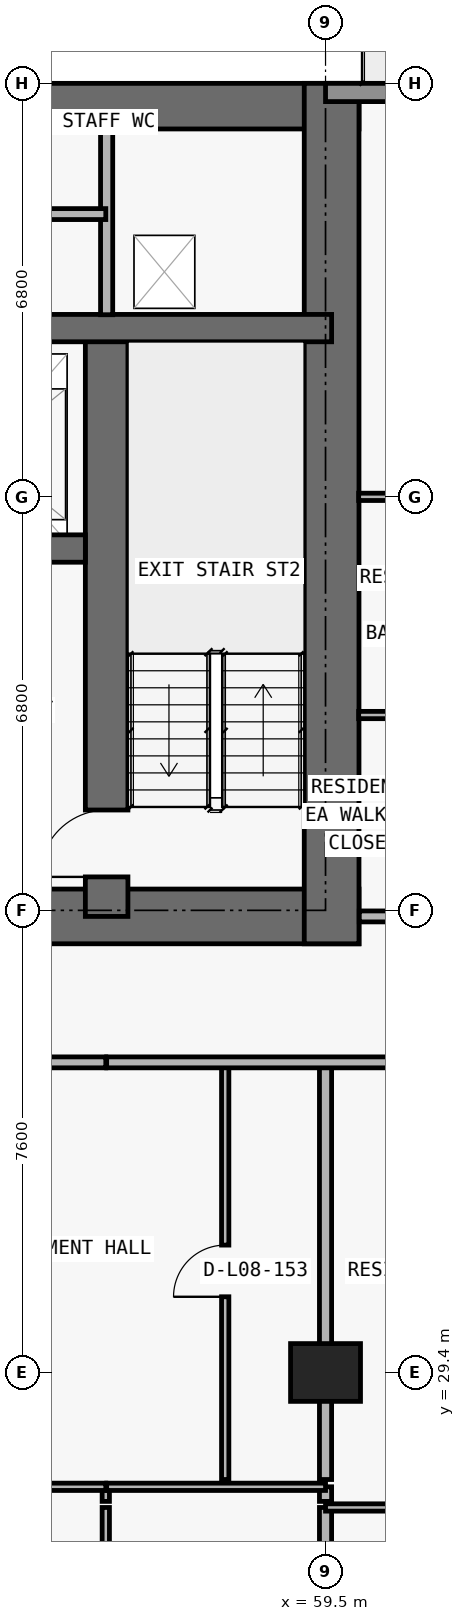
"""IFC4 building model, lengths in metres.
Left out: names, types, materials, properties, quantities, classifications, styles, units other than length and angle.
Written with IfcOpenShell. Run it as: python <this file> out.ifc"""

import sys

from ifc_helpers import new_model, si_unit, direction, frame, frame_2d, origin, origin_2d, place, context, subcontext, project, spatial, rectangle, extrude, element, fill, save


model = new_model("IFC4")
c1 = context("Model", 3, precision=1e-05, world=origin(), true_north=direction((0.0, 1.0)))
c2 = subcontext(c1, "Body", "Model", "MODEL_VIEW")
j1 = project(units=[si_unit("LENGTHUNIT", "METRE"), si_unit("PLANEANGLEUNIT", "RADIAN")], contexts=[c1])
p1 = place(None, origin())
s1 = spatial("IfcSite", under=j1, at=p1, CompositionType="ELEMENT")
p2 = place(p1, origin())
s2 = spatial("IfcBuilding", under=s1, at=p2, CompositionType="ELEMENT")
p3 = place(p2, frame((0.0, 0.0, 36.6)))
s3 = spatial("IfcBuildingStorey", under=s2, at=p3, CompositionType="ELEMENT", Elevation=36.6)
p4 = place(p3, frame((59.5, 29.4, 0.0), z_axis=(0.0, 0.0, 1.0), x_axis=(1.0, 0.0, 0.0)))
e1 = element("IfcColumn", 1, at=p4, inside=s3, PredefinedType="COLUMN", context=c2, shape_type="SweptSolid", body=[
    extrude(rectangle(XDim=1.15, YDim=0.95, at=origin_2d()), origin(), (0.0, 0.0, 1.0), 3.05),
])
p5 = place(p3, frame((17.75, 36.9, 0.0), z_axis=(0.0, 0.0, 1.0), x_axis=(1.0, 0.0, 0.0)))
e2 = element("IfcWall", 2, at=p5, inside=s3, PredefinedType="SHEAR", context=c2, shape_type="SweptSolid", body=[
    extrude(rectangle(XDim=42.3, YDim=0.9, at=frame_2d((21.15, 0.0))), origin(), (0.0, 0.0, 1.0), 3.05),
])
p6 = place(p5, frame((14.55, 0.0, 0.0)))
e3 = element("IfcOpeningElement", 3, at=p6, cuts=e2, PredefinedType="OPENING", context=c2, shape_type="SweptSolid", body=[
    extrude(rectangle(XDim=1.1, YDim=2.15, at=frame_2d((0.55, 1.075))), frame((0.0, 0.46, 0.0), z_axis=(0.0, -1.0, 0.0), x_axis=(1.0, 0.0, 0.0)), (0.0, 0.0, 1.0), 0.92),
])
p7 = place(p5, frame((6.4, 0.0, 0.0)))
e4 = element("IfcOpeningElement", 4, at=p7, cuts=e2, PredefinedType="OPENING", context=c2, shape_type="SweptSolid", body=[
    extrude(rectangle(XDim=1.05, YDim=2.15, at=frame_2d((0.525, 1.075))), frame((0.0, 0.46, 0.0), z_axis=(0.0, -1.0, 0.0), x_axis=(1.0, 0.0, 0.0)), (0.0, 0.0, 1.0), 0.92),
])
p8 = place(p5, frame((34.9, 0.0, 0.0)))
e5 = element("IfcOpeningElement", 5, at=p8, cuts=e2, PredefinedType="OPENING", context=c2, shape_type="SweptSolid", body=[
    extrude(rectangle(XDim=1.05, YDim=2.15, at=frame_2d((0.525, 1.075))), frame((0.0, 0.46, 0.0), z_axis=(0.0, -1.0, 0.0), x_axis=(1.0, 0.0, 0.0)), (0.0, 0.0, 1.0), 0.92),
])
p9 = place(p5, frame((11.012, 0.0, 0.0)))
e6 = element("IfcOpeningElement", 6, at=p9, cuts=e2, PredefinedType="OPENING", context=c2, shape_type="SweptSolid", body=[
    extrude(rectangle(XDim=1.05, YDim=2.15, at=frame_2d((0.525, 1.075))), frame((0.0, 0.46, 0.0), z_axis=(0.0, -1.0, 0.0), x_axis=(1.0, 0.0, 0.0)), (0.0, 0.0, 1.0), 0.92),
])
p10 = place(p5, frame((24.25, 0.0, 0.0)))
e7 = element("IfcOpeningElement", 7, at=p10, cuts=e2, PredefinedType="OPENING", context=c2, shape_type="SweptSolid", body=[
    extrude(rectangle(XDim=1.05, YDim=2.15, at=frame_2d((0.525, 1.075))), frame((0.0, 0.46, 0.0), z_axis=(0.0, -1.0, 0.0), x_axis=(1.0, 0.0, 0.0)), (0.0, 0.0, 1.0), 0.92),
])
p11 = place(p3, frame((17.75, 50.225, 0.0), z_axis=(0.0, 0.0, 1.0), x_axis=(1.0, 0.0, 0.0)))
e8 = element("IfcWall", 8, at=p11, inside=s3, PredefinedType="SHEAR", context=c2, shape_type="SweptSolid", body=[
    extrude(rectangle(XDim=42.3, YDim=0.75, at=frame_2d((21.15, 0.0))), origin(), (0.0, 0.0, 1.0), 3.05),
])
p12 = place(p3, frame((59.6, 36.45, 0.0), z_axis=(0.0, 0.0, 1.0), x_axis=(0.0, 1.0, 0.0)))
e9 = element("IfcWall", 9, at=p12, inside=s3, PredefinedType="SHEAR", context=c2, shape_type="SweptSolid", body=[
    extrude(rectangle(XDim=14.15, YDim=0.9, at=frame_2d((7.075, 0.0))), origin(), (0.0, 0.0, 1.0), 3.05),
])
p13 = place(p3, frame((55.9, 36.9, 0.0), z_axis=(0.0, 0.0, 1.0), x_axis=(0.0, 1.0, 0.0)))
e10 = element("IfcWall", 10, at=p13, inside=s3, PredefinedType="SHEAR", context=c2, shape_type="SweptSolid", body=[
    extrude(rectangle(XDim=9.675, YDim=0.7, at=frame_2d((4.837, 0.0))), origin(), (0.0, 0.0, 1.0), 3.05),
])
p14 = place(p13, frame((0.65, 0.0, 0.0)))
e11 = element("IfcOpeningElement", 11, at=p14, cuts=e10, PredefinedType="OPENING", context=c2, shape_type="SweptSolid", body=[
    extrude(rectangle(XDim=1.1, YDim=2.15, at=frame_2d((0.55, 1.075))), frame((0.0, 0.36, 0.0), z_axis=(0.0, -1.0, 0.0), x_axis=(1.0, 0.0, 0.0)), (0.0, 0.0, 1.0), 0.72),
])
p15 = place(p3, frame((22.25, 42.95, 0.0), z_axis=(0.0, 0.0, 1.0), x_axis=(1.0, 0.0, 0.0)))
e12 = element("IfcWall", 12, at=p15, inside=s3, PredefinedType="SHEAR", context=c2, shape_type="SweptSolid", body=[
    extrude(rectangle(XDim=33.3, YDim=0.45, at=frame_2d((16.65, 0.0))), origin(), (0.0, 0.0, 1.0), 3.05),
])
p16 = place(p15, frame((1.05, 0.0, 0.0)))
e13 = element("IfcOpeningElement", 13, at=p16, cuts=e12, PredefinedType="OPENING", context=c2, shape_type="SweptSolid", body=[
    extrude(rectangle(XDim=1.2, YDim=2.2, at=frame_2d((0.6, 1.1))), frame((0.0, 0.235, 0.0), z_axis=(0.0, -1.0, 0.0), x_axis=(1.0, 0.0, 0.0)), (0.0, 0.0, 1.0), 0.47),
])
p17 = place(p15, frame((31.05, 0.0, 0.0)))
e14 = element("IfcOpeningElement", 14, at=p17, cuts=e12, PredefinedType="OPENING", context=c2, shape_type="SweptSolid", body=[
    extrude(rectangle(XDim=1.2, YDim=2.2, at=frame_2d((0.6, 1.1))), frame((0.0, 0.235, 0.0), z_axis=(0.0, -1.0, 0.0), x_axis=(1.0, 0.0, 0.0)), (0.0, 0.0, 1.0), 0.47),
])
p18 = place(p15, frame((13.5, 0.0, 0.0)))
e15 = element("IfcOpeningElement", 15, at=p18, cuts=e12, PredefinedType="OPENING", context=c2, shape_type="SweptSolid", body=[
    extrude(rectangle(XDim=1.1, YDim=2.2, at=frame_2d((0.55, 1.1))), frame((0.0, 0.235, 0.0), z_axis=(0.0, -1.0, 0.0), x_axis=(1.0, 0.0, 0.0)), (0.0, 0.0, 1.0), 0.47),
])
p19 = place(p15, frame((16.1, 0.0, 0.0)))
e16 = element("IfcOpeningElement", 16, at=p19, cuts=e12, PredefinedType="OPENING", context=c2, shape_type="SweptSolid", body=[
    extrude(rectangle(XDim=1.1, YDim=2.2, at=frame_2d((0.55, 1.1))), frame((0.0, 0.235, 0.0), z_axis=(0.0, -1.0, 0.0), x_axis=(1.0, 0.0, 0.0)), (0.0, 0.0, 1.0), 0.47),
])
p20 = place(p15, frame((18.7, 0.0, 0.0)))
e17 = element("IfcOpeningElement", 17, at=p20, cuts=e12, PredefinedType="OPENING", context=c2, shape_type="SweptSolid", body=[
    extrude(rectangle(XDim=1.1, YDim=2.2, at=frame_2d((0.55, 1.1))), frame((0.0, 0.235, 0.0), z_axis=(0.0, -1.0, 0.0), x_axis=(1.0, 0.0, 0.0)), (0.0, 0.0, 1.0), 0.47),
])
p21 = place(p15, frame((3.625, 0.0, 0.0)))
e18 = element("IfcOpeningElement", 18, at=p21, cuts=e12, PredefinedType="OPENING", context=c2, shape_type="SweptSolid", body=[
    extrude(rectangle(XDim=1.05, YDim=2.15, at=frame_2d((0.525, 1.075))), frame((0.0, 0.235, 0.0), z_axis=(0.0, -1.0, 0.0), x_axis=(1.0, 0.0, 0.0)), (0.0, 0.0, 1.0), 0.47),
])
p22 = place(p15, frame((28.675, 0.0, 0.0)))
e19 = element("IfcOpeningElement", 19, at=p22, cuts=e12, PredefinedType="OPENING", context=c2, shape_type="SweptSolid", body=[
    extrude(rectangle(XDim=1.05, YDim=2.15, at=frame_2d((0.525, 1.075))), frame((0.0, 0.235, 0.0), z_axis=(0.0, -1.0, 0.0), x_axis=(1.0, 0.0, 0.0)), (0.0, 0.0, 1.0), 0.47),
])
p23 = place(p3, frame((18.2, 46.575, 0.0), z_axis=(0.0, 0.0, 1.0), x_axis=(1.0, 0.0, 0.0)))
e20 = element("IfcWall", 20, at=p23, inside=s3, PredefinedType="SHEAR", context=c2, shape_type="SweptSolid", body=[
    extrude(rectangle(XDim=41.4, YDim=0.45, at=frame_2d((20.7, 0.0))), origin(), (0.0, 0.0, 1.0), 3.05),
])
p24 = place(p23, frame((7.7, 0.0, 0.0)))
e21 = element("IfcOpeningElement", 21, at=p24, cuts=e20, PredefinedType="OPENING", context=c2, shape_type="SweptSolid", body=[
    extrude(rectangle(XDim=1.0, YDim=2.2, at=frame_2d((0.5, 1.1))), frame((0.0, 0.235, 0.0), z_axis=(0.0, -1.0, 0.0), x_axis=(1.0, 0.0, 0.0)), (0.0, 0.0, 1.0), 0.47),
])
p25 = place(p23, frame((32.725, 0.0, 0.0)))
e22 = element("IfcOpeningElement", 22, at=p25, cuts=e20, PredefinedType="OPENING", context=c2, shape_type="SweptSolid", body=[
    extrude(rectangle(XDim=1.05, YDim=2.15, at=frame_2d((0.525, 1.075))), frame((0.0, 0.235, 0.0), z_axis=(0.0, -1.0, 0.0), x_axis=(1.0, 0.0, 0.0)), (0.0, 0.0, 1.0), 0.47),
])
p26 = place(p3, frame((59.5, 50.45, 0.0), z_axis=(0.0, 0.0, 1.0), x_axis=(1.0, 0.0, 0.0)))
e23 = element("IfcWall", 23, at=p26, inside=s3, PredefinedType="STANDARD", context=c2, shape_type="SweptSolid", body=[
    extrude(rectangle(XDim=13.2, YDim=0.3, at=frame_2d((6.6, 0.0))), origin(), (0.0, 0.0, 1.0), 3.05),
])
p27 = place(p26, frame((5.6, 0.0, 0.0)))
e24 = element("IfcOpeningElement", 24, at=p27, cuts=e23, PredefinedType="OPENING", context=c2, shape_type="SweptSolid", body=[
    extrude(rectangle(XDim=2.0, YDim=2.3, at=frame_2d((1.0, 1.15))), frame((0.0, 0.16, 0.0), z_axis=(0.0, -1.0, 0.0), x_axis=(1.0, 0.0, 0.0)), (0.0, 0.0, 1.0), 0.32),
])
p28 = place(p3, frame((55.886, 22.49, 0.0), z_axis=(0.0, 0.0, 1.0), x_axis=(0.0, 1.0, 0.0)))
e25 = element("IfcWall", 25, at=p28, inside=s3, PredefinedType="PARTITIONING", context=c2, shape_type="SweptSolid", body=[
    extrude(rectangle(XDim=4.69, YDim=0.12, at=frame_2d((2.345, 0.0))), origin(), (0.0, 0.0, 1.0), 3.05),
])
p29 = place(p28, frame((1.895, 0.0, 0.0)))
e26 = element("IfcOpeningElement", 26, at=p29, cuts=e25, PredefinedType="OPENING", context=c2, shape_type="SweptSolid", body=[
    extrude(rectangle(XDim=0.9, YDim=2.15, at=frame_2d((0.45, 1.075))), frame((0.0, 0.07, 0.0), z_axis=(0.0, -1.0, 0.0), x_axis=(1.0, 0.0, 0.0)), (0.0, 0.0, 1.0), 0.14),
])
p30 = place(p3, frame((55.886, 27.28, 0.0), z_axis=(0.0, 0.0, 1.0), x_axis=(0.0, 1.0, 0.0)))
e27 = element("IfcWall", 27, at=p30, inside=s3, PredefinedType="PARTITIONING", context=c2, shape_type="SweptSolid", body=[
    extrude(rectangle(XDim=0.24, YDim=0.12, at=frame_2d((0.12, 0.0))), origin(), (0.0, 0.0, 1.0), 3.05),
])
p31 = place(p3, frame((55.9, 46.795, 0.0), z_axis=(0.0, 0.0, 1.0), x_axis=(0.0, 1.0, 0.0)))
e28 = element("IfcWall", 28, at=p31, inside=s3, PredefinedType="PARTITIONING", context=c2, shape_type="SweptSolid", body=[
    extrude(rectangle(XDim=3.06, YDim=0.2, at=frame_2d((1.53, 0.0))), origin(), (0.0, 0.0, 1.0), 3.05),
])
p32 = place(p3, frame((57.85, 27.64, 0.0), z_axis=(0.0, 0.0, 1.0), x_axis=(0.0, 1.0, 0.0)))
e29 = element("IfcWall", 29, at=p32, inside=s3, PredefinedType="PARTITIONING", context=c2, shape_type="SweptSolid", body=[
    extrude(rectangle(XDim=6.86, YDim=0.12, at=frame_2d((3.43, 0.0))), origin(), (0.0, 0.0, 1.0), 3.05),
])
p33 = place(p32, frame((3.005, 0.0, 0.0)))
e30 = element("IfcOpeningElement", 30, at=p33, cuts=e29, PredefinedType="OPENING", context=c2, shape_type="SweptSolid", body=[
    extrude(rectangle(XDim=0.85, YDim=2.1, at=frame_2d((0.425, 1.05))), frame((0.0, 0.07, 0.0), z_axis=(0.0, -1.0, 0.0), x_axis=(1.0, 0.0, 0.0)), (0.0, 0.0, 1.0), 0.14),
])
p34 = place(p3, frame((59.5, 22.49, 0.0), z_axis=(0.0, 0.0, 1.0), x_axis=(0.0, 1.0, 0.0)))
e31 = element("IfcWall", 31, at=p34, inside=s3, PredefinedType="PARTITIONING", context=c2, shape_type="SweptSolid", body=[
    extrude(rectangle(XDim=4.69, YDim=0.2, at=frame_2d((2.345, 0.0))), origin(), (0.0, 0.0, 1.0), 2.11),
])
p35 = place(p3, frame((59.5, 27.28, 0.0), z_axis=(0.0, 0.0, 1.0), x_axis=(0.0, 1.0, 0.0)))
e32 = element("IfcWall", 32, at=p35, inside=s3, PredefinedType="PARTITIONING", context=c2, shape_type="SweptSolid", body=[
    extrude(rectangle(XDim=0.24, YDim=0.2, at=frame_2d((0.12, 0.0))), origin(), (0.0, 0.0, 1.0), 2.11),
])
p36 = place(p3, frame((59.5, 27.64, 0.0), z_axis=(0.0, 0.0, 1.0), x_axis=(0.0, 1.0, 0.0)))
e33 = element("IfcWall", 33, at=p36, inside=s3, PredefinedType="PARTITIONING", context=c2, shape_type="SweptSolid", body=[
    extrude(rectangle(XDim=6.86, YDim=0.2, at=frame_2d((3.43, 0.0))), origin(), (0.0, 0.0, 1.0), 2.11),
])
p37 = place(p3, frame((59.5, 27.18, 0.0), z_axis=(0.0, 0.0, 1.0), x_axis=(1.0, 0.0, 0.0)))
e34 = element("IfcWall", 34, at=p37, inside=s3, PredefinedType="PARTITIONING", context=c2, shape_type="SweptSolid", body=[
    extrude(rectangle(XDim=8.4, YDim=0.12, at=frame_2d((4.2, 0.0))), origin(), (0.0, 0.0, 1.0), 3.05),
])
p38 = place(p37, frame((1.693, 0.0, 0.0)))
e35 = element("IfcOpeningElement", 35, at=p38, cuts=e34, PredefinedType="OPENING", context=c2, shape_type="SweptSolid", body=[
    extrude(rectangle(XDim=0.9, YDim=2.15, at=frame_2d((0.45, 1.075))), frame((0.0, 0.07, 0.0), z_axis=(0.0, -1.0, 0.0), x_axis=(1.0, 0.0, 0.0)), (0.0, 0.0, 1.0), 0.14),
])
p39 = place(p3, frame((51.37, 27.52, 0.0), z_axis=(0.0, 0.0, 1.0), x_axis=(1.0, 0.0, 0.0)))
e36 = element("IfcWall", 36, at=p39, inside=s3, PredefinedType="PARTITIONING", context=c2, shape_type="SweptSolid", body=[
    extrude(rectangle(XDim=4.516, YDim=0.12, at=frame_2d((2.258, 0.0))), origin(), (0.0, 0.0, 1.0), 3.05),
])
p40 = place(p39, frame((1.808, 0.0, 0.0)))
e37 = element("IfcOpeningElement", 37, at=p40, cuts=e36, PredefinedType="OPENING", context=c2, shape_type="SweptSolid", body=[
    extrude(rectangle(XDim=0.9, YDim=2.15, at=frame_2d((0.45, 1.075))), frame((0.0, 0.07, 0.0), z_axis=(0.0, -1.0, 0.0), x_axis=(1.0, 0.0, 0.0)), (0.0, 0.0, 1.0), 0.14),
])
p41 = place(p3, frame((55.9, 27.52, 0.0), z_axis=(0.0, 0.0, 1.0), x_axis=(1.0, 0.0, 0.0)))
e38 = element("IfcWall", 38, at=p41, inside=s3, PredefinedType="PARTITIONING", context=c2, shape_type="SweptSolid", body=[
    extrude(rectangle(XDim=3.6, YDim=0.12, at=frame_2d((1.8, 0.0))), origin(), (0.0, 0.0, 1.0), 3.05),
])
p42 = place(p3, frame((5.105, 34.5, 0.0), z_axis=(0.0, 0.0, 1.0), x_axis=(1.0, 0.0, 0.0)))
e39 = element("IfcWall", 39, at=p42, inside=s3, PredefinedType="PARTITIONING", context=c2, shape_type="SweptSolid", body=[
    extrude(rectangle(XDim=50.781, YDim=0.18, at=frame_2d((25.391, 0.0))), origin(), (0.0, 0.0, 1.0), 3.05),
])
p43 = place(p42, frame((7.67, 0.0, 0.0)))
e40 = element("IfcOpeningElement", 40, at=p43, cuts=e39, PredefinedType="OPENING", context=c2, shape_type="SweptSolid", body=[
    extrude(rectangle(XDim=1.0, YDim=2.2, at=frame_2d((0.5, 1.1))), frame((0.0, 0.1, 0.0), z_axis=(0.0, -1.0, 0.0), x_axis=(1.0, 0.0, 0.0)), (0.0, 0.0, 1.0), 0.2),
])
p44 = place(p42, frame((16.07, 0.0, 0.0)))
e41 = element("IfcOpeningElement", 41, at=p44, cuts=e39, PredefinedType="OPENING", context=c2, shape_type="SweptSolid", body=[
    extrude(rectangle(XDim=1.0, YDim=2.2, at=frame_2d((0.5, 1.1))), frame((0.0, 0.1, 0.0), z_axis=(0.0, -1.0, 0.0), x_axis=(1.0, 0.0, 0.0)), (0.0, 0.0, 1.0), 0.2),
])
p45 = place(p42, frame((24.47, 0.0, 0.0)))
e42 = element("IfcOpeningElement", 42, at=p45, cuts=e39, PredefinedType="OPENING", context=c2, shape_type="SweptSolid", body=[
    extrude(rectangle(XDim=1.0, YDim=2.2, at=frame_2d((0.5, 1.1))), frame((0.0, 0.1, 0.0), z_axis=(0.0, -1.0, 0.0), x_axis=(1.0, 0.0, 0.0)), (0.0, 0.0, 1.0), 0.2),
])
p46 = place(p42, frame((32.545, 0.0, 0.0)))
e43 = element("IfcOpeningElement", 43, at=p46, cuts=e39, PredefinedType="OPENING", context=c2, shape_type="SweptSolid", body=[
    extrude(rectangle(XDim=1.0, YDim=2.2, at=frame_2d((0.5, 1.1))), frame((0.0, 0.1, 0.0), z_axis=(0.0, -1.0, 0.0), x_axis=(1.0, 0.0, 0.0)), (0.0, 0.0, 1.0), 0.2),
])
p47 = place(p42, frame((47.888, 0.0, 0.0)))
e44 = element("IfcOpeningElement", 44, at=p47, cuts=e39, PredefinedType="OPENING", context=c2, shape_type="SweptSolid", body=[
    extrude(rectangle(XDim=1.0, YDim=2.2, at=frame_2d((0.5, 1.1))), frame((0.0, 0.1, 0.0), z_axis=(0.0, -1.0, 0.0), x_axis=(1.0, 0.0, 0.0)), (0.0, 0.0, 1.0), 0.2),
])
p48 = place(p3, frame((55.9, 34.5, 0.0), z_axis=(0.0, 0.0, 1.0), x_axis=(1.0, 0.0, 0.0)))
e45 = element("IfcWall", 45, at=p48, inside=s3, PredefinedType="PARTITIONING", context=c2, shape_type="SweptSolid", body=[
    extrude(rectangle(XDim=16.8, YDim=0.18, at=frame_2d((8.4, 0.0))), origin(), (0.0, 0.0, 1.0), 3.05),
])
p49 = place(p48, frame((6.475, 0.0, 0.0)))
e46 = element("IfcOpeningElement", 46, at=p49, cuts=e45, PredefinedType="OPENING", context=c2, shape_type="SweptSolid", body=[
    extrude(rectangle(XDim=1.0, YDim=2.2, at=frame_2d((0.5, 1.1))), frame((0.0, 0.1, 0.0), z_axis=(0.0, -1.0, 0.0), x_axis=(1.0, 0.0, 0.0)), (0.0, 0.0, 1.0), 0.2),
])
p50 = place(p3, frame((60.055, 36.9, 0.0), z_axis=(0.0, 0.0, 1.0), x_axis=(1.0, 0.0, 0.0)))
e47 = element("IfcWall", 47, at=p50, inside=s3, PredefinedType="PARTITIONING", context=c2, shape_type="SweptSolid", body=[
    extrude(rectangle(XDim=12.645, YDim=0.18, at=frame_2d((6.323, 0.0))), origin(), (0.0, 0.0, 1.0), 3.05),
])
p51 = place(p50, frame((4.52, 0.0, 0.0)))
e48 = element("IfcOpeningElement", 48, at=p51, cuts=e47, PredefinedType="OPENING", context=c2, shape_type="SweptSolid", body=[
    extrude(rectangle(XDim=1.0, YDim=2.2, at=frame_2d((0.5, 1.1))), frame((0.0, 0.1, 0.0), z_axis=(0.0, -1.0, 0.0), x_axis=(1.0, 0.0, 0.0)), (0.0, 0.0, 1.0), 0.2),
])
p52 = place(p3, frame((60.045, 40.212, 0.0), z_axis=(0.0, 0.0, 1.0), x_axis=(1.0, 0.0, 0.0)))
e49 = element("IfcWall", 49, at=p52, inside=s3, PredefinedType="PARTITIONING", context=c2, shape_type="SweptSolid", body=[
    extrude(rectangle(XDim=2.205, YDim=0.12, at=frame_2d((1.103, 0.0))), origin(), (0.0, 0.0, 1.0), 3.05),
])
p53 = place(p3, frame((60.045, 43.8, 0.0), z_axis=(0.0, 0.0, 1.0), x_axis=(1.0, 0.0, 0.0)))
e50 = element("IfcWall", 50, at=p53, inside=s3, PredefinedType="PARTITIONING", context=c2, shape_type="SweptSolid", body=[
    extrude(rectangle(XDim=15.96, YDim=0.12, at=frame_2d((7.98, 0.0))), origin(), (0.0, 0.0, 1.0), 2.339),
])
p54 = place(p53, frame((9.805, 0.0, 0.0)))
e51 = element("IfcOpeningElement", 51, at=p54, cuts=e50, PredefinedType="OPENING", context=c2, shape_type="SweptSolid", body=[
    extrude(rectangle(XDim=0.9, YDim=2.15, at=frame_2d((0.45, 1.075))), frame((0.0, 0.07, 0.0), z_axis=(0.0, -1.0, 0.0), x_axis=(1.0, 0.0, 0.0)), (0.0, 0.0, 1.0), 0.14),
])
p55 = place(p53, frame((4.58, 0.0, 0.0)))
e52 = element("IfcOpeningElement", 52, at=p55, cuts=e50, PredefinedType="OPENING", context=c2, shape_type="SweptSolid", body=[
    extrude(rectangle(XDim=0.9, YDim=2.15, at=frame_2d((0.45, 1.075))), frame((0.0, 0.07, 0.0), z_axis=(0.0, -1.0, 0.0), x_axis=(1.0, 0.0, 0.0)), (0.0, 0.0, 1.0), 0.14),
])
p56 = place(p53, frame((0.677, 0.0, 0.0)))
e53 = element("IfcOpeningElement", 53, at=p56, cuts=e50, PredefinedType="OPENING", context=c2, shape_type="SweptSolid", body=[
    extrude(rectangle(XDim=0.85, YDim=2.1, at=frame_2d((0.425, 1.05))), frame((0.0, 0.07, 0.0), z_axis=(0.0, -1.0, 0.0), x_axis=(1.0, 0.0, 0.0)), (0.0, 0.0, 1.0), 0.14),
])
p57 = place(p3, frame((41.2, 48.45, 0.0), z_axis=(0.0, 0.0, 1.0), x_axis=(1.0, 0.0, 0.0)))
e54 = element("IfcWall", 54, at=p57, inside=s3, PredefinedType="PARTITIONING", context=c2, shape_type="SweptSolid", body=[
    extrude(rectangle(XDim=14.686, YDim=0.18, at=frame_2d((7.343, 0.0))), origin(), (0.0, 0.0, 1.0), 3.05),
])
p58 = place(p57, frame((1.85, 0.0, 0.0)))
e55 = element("IfcOpeningElement", 55, at=p58, cuts=e54, PredefinedType="OPENING", context=c2, shape_type="SweptSolid", body=[
    extrude(rectangle(XDim=1.2, YDim=2.2, at=frame_2d((0.6, 1.1))), frame((0.0, 0.1, 0.0), z_axis=(0.0, -1.0, 0.0), x_axis=(1.0, 0.0, 0.0)), (0.0, 0.0, 1.0), 0.2),
])
p59 = place(p57, frame((6.75, 0.0, 0.0)))
e56 = element("IfcOpeningElement", 56, at=p59, cuts=e54, PredefinedType="OPENING", context=c2, shape_type="SweptSolid", body=[
    extrude(rectangle(XDim=1.2, YDim=2.2, at=frame_2d((0.6, 1.1))), frame((0.0, 0.1, 0.0), z_axis=(0.0, -1.0, 0.0), x_axis=(1.0, 0.0, 0.0)), (0.0, 0.0, 1.0), 0.2),
])
p60 = place(p57, frame((11.818, 0.0, 0.0)))
e57 = element("IfcOpeningElement", 57, at=p60, cuts=e54, PredefinedType="OPENING", context=c2, shape_type="SweptSolid", body=[
    extrude(rectangle(XDim=0.85, YDim=2.1, at=frame_2d((0.425, 1.05))), frame((0.0, 0.1, 0.0), z_axis=(0.0, -1.0, 0.0), x_axis=(1.0, 0.0, 0.0)), (0.0, 0.0, 1.0), 0.2),
])
p61 = place(p14, origin())
e58 = element("IfcDoor", 58, at=p61, inside=s3, OperationType="SINGLE_SWING_LEFT", PredefinedType="DOOR", context=c2, shape_type="SweptSolid", body=[
    extrude(rectangle(XDim=1.1, YDim=2.15, at=frame_2d((0.55, 1.075))), frame((0.0, 0.025, 0.0), z_axis=(0.0, -1.0, 0.0), x_axis=(1.0, 0.0, 0.0)), (0.0, 0.0, 1.0), 0.05),
])
fill(e11, e58)
p62 = place(p33, origin())
e59 = element("IfcDoor", 59, at=p62, inside=s3, OperationType="SINGLE_SWING_LEFT", PredefinedType="DOOR", context=c2, shape_type="SweptSolid", body=[
    extrude(rectangle(XDim=0.85, YDim=2.1, at=frame_2d((0.425, 1.05))), frame((0.0, 0.025, 0.0), z_axis=(0.0, -1.0, 0.0), x_axis=(1.0, 0.0, 0.0)), (0.0, 0.0, 1.0), 0.05),
])
fill(e30, e59)
save(model, sys.argv[1])
